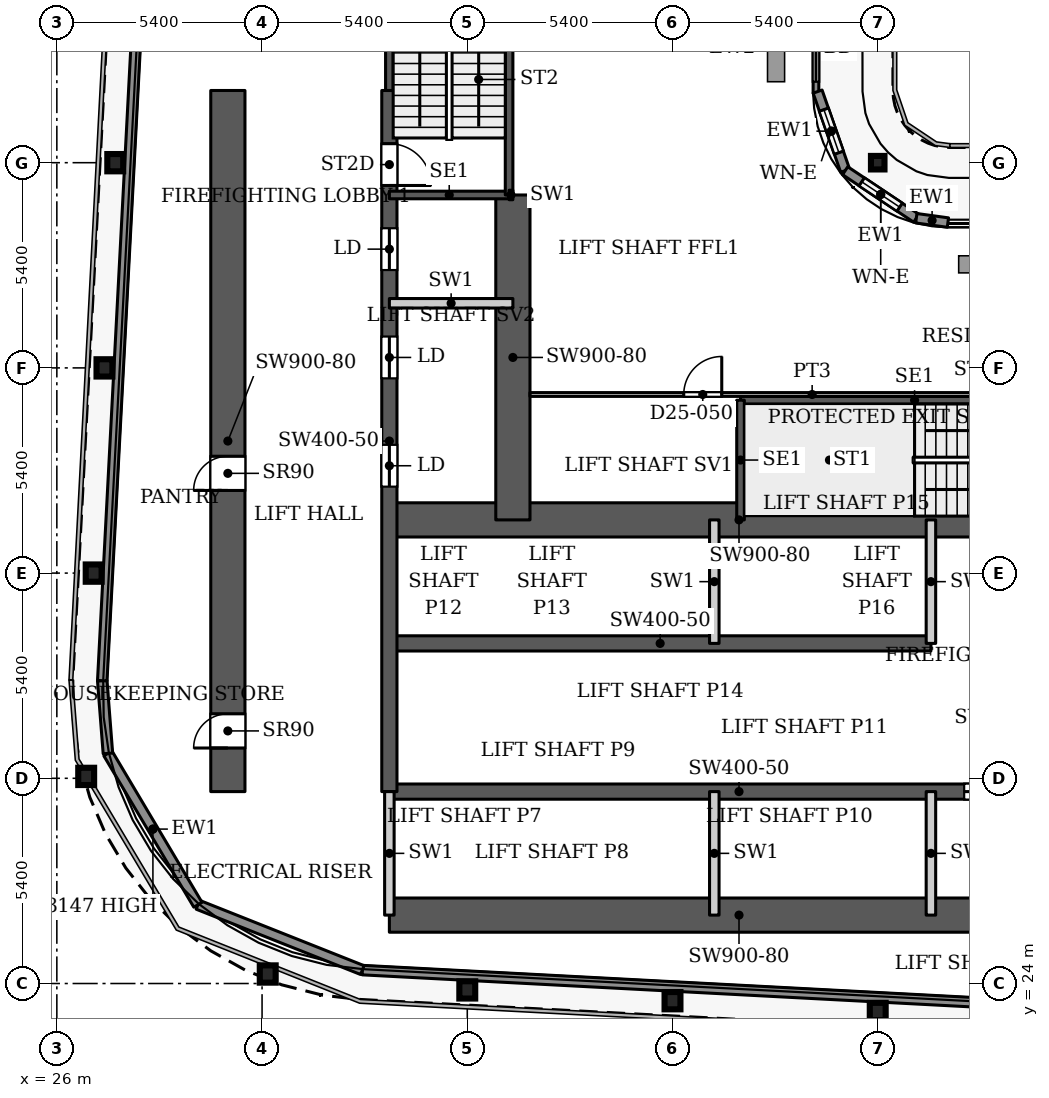
"""IFC4 building model, lengths in metres.
Left out: names, types, materials, properties, quantities, classifications, styles, units other than length and angle.
Written with IfcOpenShell. Run it as: python <this file> out.ifc"""

import sys

from ifc_helpers import new_model, si_unit, direction, frame, frame_2d, origin, origin_2d, place, context, subcontext, project, spatial, rectangle, hollow_rectangle, i_section, extrude, source, transform, mapped, element, fill, save


model = new_model("IFC4")
c1 = context("Model", 3, precision=1e-05, world=origin(), true_north=direction((0.0, 1.0)))
c2 = subcontext(c1, "Body", "Model", "MODEL_VIEW")
j1 = project(units=[si_unit("LENGTHUNIT", "METRE"), si_unit("PLANEANGLEUNIT", "RADIAN")], contexts=[c1])
p1 = place(None, origin())
s1 = spatial("IfcSite", under=j1, at=p1, CompositionType="ELEMENT")
p2 = place(p1, origin())
s2 = spatial("IfcBuilding", under=s1, at=p2, CompositionType="ELEMENT")
p3 = place(p2, frame((0.0, 0.0, 109.7)))
s3 = spatial("IfcBuildingStorey", under=s2, at=p3, CompositionType="ELEMENT", Elevation=109.7)
for number, where, z_axis, x_axis in (
    (1, (47.6, 23.264, 0.0), (0.0, 0.0, 1.0), (1.0, 0.0, 0.0)),
    (2, (42.2, 23.548, 0.0), (0.0, 0.0, 1.0), (1.0, 0.0, 0.0)),
    (3, (36.8, 23.832, 0.0), (0.0, 0.0, 1.0), (1.0, 0.0, 0.0)),
    (4, (31.549, 24.25, 0.0), (0.0, 0.0, 1.0), (1.0, 0.0, 0.0)),
    (5, (26.772, 29.45, 0.0), (0.0, 0.0, 1.0), (1.0, 0.0, 0.0)),
    (6, (26.969, 34.8, 0.0), (0.0, 0.0, 1.0), (1.0, 0.0, 0.0)),
    (7, (27.253, 40.2, 0.0), (0.0, 0.0, 1.0), (1.0, 0.0, 0.0)),
    (8, (27.537, 45.6, 0.0), (0.0, 0.0, 1.0), (1.0, 0.0, 0.0)),
):
    element("IfcColumn", number, at=place(p3, frame(where, z_axis=z_axis, x_axis=x_axis)), inside=s3, PredefinedType="COLUMN", context=c2, shape_type="SweptSolid", body=[
        extrude(i_section(OverallWidth=0.418, OverallDepth=0.455, WebThickness=0.042, FlangeThickness=0.068, FilletRadius=0.014, at=origin_2d()), origin(), (0.0, 0.0, 1.0), 3.9),
    ])
p4 = place(p3, frame((47.6, 45.6, 0.0), z_axis=(0.0, 0.0, 1.0), x_axis=(1.0, 0.0, 0.0)))
e9 = element("IfcColumn", 9, at=p4, inside=s3, PredefinedType="COLUMN", context=c2, shape_type="SweptSolid", body=[
    extrude(hollow_rectangle(XDim=0.356, YDim=0.356, WallThickness=0.016, InnerFilletRadius=0.016, OuterFilletRadius=0.032, at=origin_2d()), origin(), (0.0, 0.0, 1.0), 3.9),
])
p5 = place(p3, frame((34.75, 25.8, 0.0), z_axis=(0.0, 0.0, 1.0), x_axis=(1.0, 0.0, 0.0)))
e10 = element("IfcWall", 10, at=p5, inside=s3, PredefinedType="SHEAR", context=c2, shape_type="SweptSolid", body=[
    extrude(rectangle(XDim=18.4, YDim=0.9, at=frame_2d((9.2, 0.0))), origin(), (0.0, 0.0, 1.0), 3.9),
])
p6 = place(p3, frame((34.75, 29.05, 0.0), z_axis=(0.0, 0.0, 1.0), x_axis=(1.0, 0.0, 0.0)))
e11 = element("IfcWall", 11, at=p6, inside=s3, PredefinedType="SHEAR", context=c2, shape_type="SweptSolid", body=[
    extrude(rectangle(XDim=18.4, YDim=0.4, at=frame_2d((9.2, 0.0))), origin(), (0.0, 0.0, 1.0), 3.9),
])
p7 = place(p6, frame((15.125, 0.0, 0.0)))
e12 = element("IfcOpeningElement", 12, at=p7, cuts=e11, PredefinedType="OPENING", context=c2, shape_type="SweptSolid", body=[
    extrude(rectangle(XDim=1.1, YDim=2.2, at=frame_2d((0.55, 1.1))), frame((0.0, 0.21, 0.0), z_axis=(0.0, -1.0, 0.0), x_axis=(1.0, 0.0, 0.0)), (0.0, 0.0, 1.0), 0.42),
])
p8 = place(p3, frame((34.75, 32.95, 0.0), z_axis=(0.0, 0.0, 1.0), x_axis=(1.0, 0.0, 0.0)))
e13 = element("IfcWall", 13, at=p8, inside=s3, PredefinedType="SHEAR", context=c2, shape_type="SweptSolid", body=[
    extrude(rectangle(XDim=14.25, YDim=0.4, at=frame_2d((7.125, 0.0))), origin(), (0.0, 0.0, 1.0), 3.9),
])
p9 = place(p3, frame((34.75, 36.2, 0.0), z_axis=(0.0, 0.0, 1.0), x_axis=(1.0, 0.0, 0.0)))
e14 = element("IfcWall", 14, at=p9, inside=s3, PredefinedType="SHEAR", context=c2, shape_type="SweptSolid", body=[
    extrude(rectangle(XDim=18.4, YDim=0.9, at=frame_2d((9.2, 0.0))), origin(), (0.0, 0.0, 1.0), 3.9),
])
p10 = place(p9, frame((16.9, 0.0, 0.0)))
e15 = element("IfcOpeningElement", 15, at=p10, cuts=e14, PredefinedType="OPENING", context=c2, shape_type="SweptSolid", body=[
    extrude(rectangle(XDim=1.0, YDim=2.2, at=frame_2d((0.5, 1.1))), frame((0.0, 0.46, 0.0), z_axis=(0.0, -1.0, 0.0), x_axis=(1.0, 0.0, 0.0)), (0.0, 0.0, 1.0), 0.92),
])
p11 = place(p3, frame((34.75, 29.05, 0.0), z_axis=(0.0, 0.0, 1.0), x_axis=(0.0, 1.0, 0.0)))
e16 = element("IfcWall", 16, at=p11, inside=s3, PredefinedType="SHEAR", context=c2, shape_type="SweptSolid", body=[
    extrude(rectangle(XDim=18.45, YDim=0.4, at=frame_2d((9.225, 0.0))), origin(), (0.0, 0.0, 1.0), 3.9),
])
p12 = place(p11, frame((8.025, 0.0, 0.0)))
e17 = element("IfcOpeningElement", 17, at=p12, cuts=e16, PredefinedType="OPENING", context=c2, shape_type="SweptSolid", body=[
    extrude(rectangle(XDim=1.1, YDim=2.2, at=frame_2d((0.55, 1.1))), frame((0.0, 0.21, 0.0), z_axis=(0.0, -1.0, 0.0), x_axis=(1.0, 0.0, 0.0)), (0.0, 0.0, 1.0), 0.42),
])
p13 = place(p11, frame((10.875, 0.0, 0.0)))
e18 = element("IfcOpeningElement", 18, at=p13, cuts=e16, PredefinedType="OPENING", context=c2, shape_type="SweptSolid", body=[
    extrude(rectangle(XDim=1.1, YDim=2.2, at=frame_2d((0.55, 1.1))), frame((0.0, 0.21, 0.0), z_axis=(0.0, -1.0, 0.0), x_axis=(1.0, 0.0, 0.0)), (0.0, 0.0, 1.0), 0.42),
])
p14 = place(p11, frame((13.725, 0.0, 0.0)))
e19 = element("IfcOpeningElement", 19, at=p14, cuts=e16, PredefinedType="OPENING", context=c2, shape_type="SweptSolid", body=[
    extrude(rectangle(XDim=1.1, YDim=2.2, at=frame_2d((0.55, 1.1))), frame((0.0, 0.21, 0.0), z_axis=(0.0, -1.0, 0.0), x_axis=(1.0, 0.0, 0.0)), (0.0, 0.0, 1.0), 0.42),
])
p15 = place(p11, frame((15.95, 0.0, 0.0)))
e20 = element("IfcOpeningElement", 20, at=p15, cuts=e16, PredefinedType="OPENING", context=c2, shape_type="SweptSolid", body=[
    extrude(rectangle(XDim=1.1, YDim=2.2, at=frame_2d((0.55, 1.1))), frame((0.0, 0.21, 0.0), z_axis=(0.0, -1.0, 0.0), x_axis=(1.0, 0.0, 0.0)), (0.0, 0.0, 1.0), 0.42),
])
p16 = place(p3, frame((38.0, 36.2, 0.0), z_axis=(0.0, 0.0, 1.0), x_axis=(0.0, 1.0, 0.0)))
e21 = element("IfcWall", 21, at=p16, inside=s3, PredefinedType="SHEAR", context=c2, shape_type="SweptSolid", body=[
    extrude(rectangle(XDim=8.55, YDim=0.9, at=frame_2d((4.275, 0.0))), origin(), (0.0, 0.0, 1.0), 3.9),
])
p17 = place(p3, frame((30.5, 29.05, 0.0), z_axis=(0.0, 0.0, 1.0), x_axis=(0.0, 1.0, 0.0)))
e22 = element("IfcWall", 22, at=p17, inside=s3, PredefinedType="SHEAR", context=c2, shape_type="SweptSolid", body=[
    extrude(rectangle(XDim=18.45, YDim=0.9, at=frame_2d((9.225, 0.0))), origin(), (0.0, 0.0, 1.0), 3.9),
])
p18 = place(p17, frame((1.147, 0.0, 0.0)))
e23 = element("IfcOpeningElement", 23, at=p18, cuts=e22, PredefinedType="OPENING", context=c2, shape_type="SweptSolid", body=[
    extrude(rectangle(XDim=0.9, YDim=2.2, at=frame_2d((0.45, 1.1))), frame((0.0, 0.46, 0.0), z_axis=(0.0, -1.0, 0.0), x_axis=(1.0, 0.0, 0.0)), (0.0, 0.0, 1.0), 0.92),
])
p19 = place(p17, frame((7.925, 0.0, 0.0)))
e24 = element("IfcOpeningElement", 24, at=p19, cuts=e22, PredefinedType="OPENING", context=c2, shape_type="SweptSolid", body=[
    extrude(rectangle(XDim=0.9, YDim=2.2, at=frame_2d((0.45, 1.1))), frame((0.0, 0.46, 0.0), z_axis=(0.0, -1.0, 0.0), x_axis=(1.0, 0.0, 0.0)), (0.0, 0.0, 1.0), 0.92),
])
p20 = place(p3, frame((45.975, 49.83, 0.0), z_axis=(0.0, 0.0, 1.0), x_axis=(0.0, -1.0, 0.0)))
e25 = element("IfcWall", 25, at=p20, inside=s3, PredefinedType="SOLIDWALL", context=c2, shape_type="SweptSolid", body=[
    extrude(rectangle(XDim=2.4, YDim=0.15, at=frame_2d((1.2, 0.0))), origin(), (0.0, 0.0, 1.0), 3.75),
])
p21 = place(p20, frame((0.3, 0.0, 0.0)))
e26 = element("IfcOpeningElement", 26, at=p21, cuts=e25, PredefinedType="OPENING", context=c2, shape_type="SweptSolid", body=[
    extrude(rectangle(XDim=1.8, YDim=2.4, at=frame_2d((0.9, 1.2))), frame((0.0, 0.085, 0.0), z_axis=(0.0, -1.0, 0.0), x_axis=(1.0, 0.0, 0.0)), (0.0, 0.0, 1.0), 0.17),
])
p22 = place(p3, frame((46.018, 47.471, 0.0), z_axis=(0.0, 0.0, 1.0), x_axis=(0.328791208903, -0.944402637093, 0.0)))
e27 = element("IfcWall", 27, at=p22, inside=s3, PredefinedType="SOLIDWALL", context=c2, shape_type="SweptSolid", body=[
    extrude(rectangle(XDim=2.205, YDim=0.25, at=frame_2d((1.102, 0.0))), origin(), (0.0, 0.0, 1.0), 3.75),
])
p23 = place(p22, frame((0.503, 0.0, 0.6)))
e28 = element("IfcOpeningElement", 28, at=p23, cuts=e27, PredefinedType="OPENING", context=c2, shape_type="SweptSolid", body=[
    extrude(rectangle(XDim=1.2, YDim=2.1, at=frame_2d((0.6, 1.05))), frame((0.0, 0.135, 0.0), z_axis=(0.0, -1.0, 0.0), x_axis=(1.0, 0.0, 0.0)), (0.0, 0.0, 1.0), 0.27),
])
p24 = place(p3, frame((46.743, 45.389, 0.0), z_axis=(0.0, 0.0, 1.0), x_axis=(0.831449265529, -0.555600682912, 0.0)))
e29 = element("IfcWall", 29, at=p24, inside=s3, PredefinedType="SOLIDWALL", context=c2, shape_type="SweptSolid", body=[
    extrude(rectangle(XDim=2.251, YDim=0.25, at=frame_2d((1.126, 0.0))), origin(), (0.0, 0.0, 1.0), 3.75),
])
p25 = place(p24, frame((0.525, 0.0, 0.6)))
e30 = element("IfcOpeningElement", 30, at=p25, cuts=e29, PredefinedType="OPENING", context=c2, shape_type="SweptSolid", body=[
    extrude(rectangle(XDim=1.2, YDim=2.1, at=frame_2d((0.6, 1.05))), frame((0.0, 0.135, 0.0), z_axis=(0.0, -1.0, 0.0), x_axis=(1.0, 0.0, 0.0)), (0.0, 0.0, 1.0), 0.27),
])
p26 = place(p3, frame((48.615, 44.138, 0.0), z_axis=(0.0, 0.0, 1.0), x_axis=(0.990741504246, -0.135761819977, 0.0)))
e31 = element("IfcWall", 31, at=p26, inside=s3, PredefinedType="SOLIDWALL", context=c2, shape_type="SweptSolid", body=[
    extrude(rectangle(XDim=0.84, YDim=0.25, at=frame_2d((0.42, 0.0))), origin(), (0.0, 0.0, 1.0), 3.75),
])
p27 = place(p3, frame((100.586, 20.85, 0.0), z_axis=(0.0, 0.0, 1.0), x_axis=(-0.99861746497, 0.052565755559, 0.0)))
e32 = element("IfcWall", 32, at=p27, inside=s3, PredefinedType="SOLIDWALL", context=c2, shape_type="SweptSolid", body=[
    extrude(rectangle(XDim=66.639, YDim=0.25, at=frame_2d((33.319, 0.0))), origin(), (0.0, 0.0, 1.0), 3.75),
])
p28 = place(p3, frame((34.039, 24.353, 0.0), z_axis=(0.0, 0.0, 1.0), x_axis=(-0.929352825399, 0.369192803184, 0.0)))
e33 = element("IfcWall", 33, at=p28, inside=s3, PredefinedType="SOLIDWALL", context=c2, shape_type="SweptSolid", body=[
    extrude(rectangle(XDim=4.656, YDim=0.25, at=frame_2d((2.328, 0.0))), origin(), (0.0, 0.0, 1.0), 3.75),
])
p29 = place(p3, frame((29.712, 26.072, 0.0), z_axis=(0.0, 0.0, 1.0), x_axis=(-0.511028049012, 0.859564036662, 0.0)))
e34 = element("IfcWall", 34, at=p29, inside=s3, PredefinedType="SOLIDWALL", context=c2, shape_type="SweptSolid", body=[
    extrude(rectangle(XDim=4.634, YDim=0.25, at=frame_2d((2.317, 0.0))), origin(), (0.0, 0.0, 1.0), 3.147),
])
p30 = place(p3, frame((27.344, 30.055, 0.0), z_axis=(0.0, 0.0, 1.0), x_axis=(-0.077571675317, 0.99698677784, 0.0)))
e35 = element("IfcWall", 35, at=p30, inside=s3, PredefinedType="SOLIDWALL", context=c2, shape_type="SweptSolid", body=[
    extrude(rectangle(XDim=1.92, YDim=0.25, at=frame_2d((0.96, 0.0))), origin(), (0.0, 0.0, 1.0), 3.75),
])
p31 = place(p3, frame((27.195, 31.969, 0.0), z_axis=(0.0, 0.0, 1.0), x_axis=(0.052555284099, 0.998618016117, 0.0)))
e36 = element("IfcWall", 36, at=p31, inside=s3, PredefinedType="SOLIDWALL", context=c2, shape_type="SweptSolid", body=[
    extrude(rectangle(XDim=61.38, YDim=0.25, at=frame_2d((30.69, 0.0))), origin(), (0.0, 0.0, 1.0), 3.75),
])
p32 = place(p3, frame((43.99, 39.35, 0.0), z_axis=(0.0, 0.0, 1.0), x_axis=(1.0, 0.0, 0.0)))
e37 = element("IfcWall", 37, at=p32, inside=s3, PredefinedType="SHEAR", context=c2, shape_type="SweptSolid", body=[
    extrude(rectangle(XDim=9.16, YDim=0.2, at=frame_2d((4.58, 0.0))), origin(), (0.0, 0.0, 1.0), 3.9),
])
p33 = place(p3, frame((43.99, 36.2, 0.0), z_axis=(0.0, 0.0, 1.0), x_axis=(0.0, 1.0, 0.0)))
e38 = element("IfcWall", 38, at=p33, inside=s3, PredefinedType="SHEAR", context=c2, shape_type="SweptSolid", body=[
    extrude(rectangle(XDim=3.15, YDim=0.2, at=frame_2d((1.575, 0.0))), origin(), (0.0, 0.0, 1.0), 3.9),
])
p34 = place(p3, frame((34.75, 44.75, 0.0), z_axis=(0.0, 0.0, 1.0), x_axis=(1.0, 0.0, 0.0)))
e39 = element("IfcWall", 39, at=p34, inside=s3, PredefinedType="SHEAR", context=c2, shape_type="SweptSolid", body=[
    extrude(rectangle(XDim=3.15, YDim=0.2, at=frame_2d((1.575, 0.0))), origin(), (0.0, 0.0, 1.0), 3.9),
])
p35 = place(p3, frame((34.75, 47.5, 0.0), z_axis=(0.0, 0.0, 1.0), x_axis=(0.0, 1.0, 0.0)))
e40 = element("IfcWall", 40, at=p35, inside=s3, PredefinedType="SHEAR", context=c2, shape_type="SweptSolid", body=[
    extrude(rectangle(XDim=6.41, YDim=0.2, at=frame_2d((3.205, 0.0))), origin(), (0.0, 0.0, 1.0), 3.9),
])
p36 = place(p3, frame((37.9, 44.75, 0.0), z_axis=(0.0, 0.0, 1.0), x_axis=(0.0, 1.0, 0.0)))
e41 = element("IfcWall", 41, at=p36, inside=s3, PredefinedType="SHEAR", context=c2, shape_type="SweptSolid", body=[
    extrude(rectangle(XDim=9.16, YDim=0.2, at=frame_2d((4.58, 0.0))), origin(), (0.0, 0.0, 1.0), 3.9),
])
for number, where, z_axis, x_axis in (
    (42, (34.75, 25.8, 0.0), (0.0, 0.0, 1.0), (0.0, 1.0, 0.0)),
    (43, (43.3, 25.8, 0.0), (0.0, 0.0, 1.0), (0.0, 1.0, 0.0)),
    (44, (43.3, 32.95, 0.0), (0.0, 0.0, 1.0), (0.0, 1.0, 0.0)),
    (45, (49.0, 25.8, 0.0), (0.0, 0.0, 1.0), (0.0, 1.0, 0.0)),
    (46, (49.0, 32.95, 0.0), (0.0, 0.0, 1.0), (0.0, 1.0, 0.0)),
    (47, (34.75, 41.9, 0.0), (0.0, 0.0, 1.0), (1.0, 0.0, 0.0)),
):
    element("IfcWall", number, at=place(p3, frame(where, z_axis=z_axis, x_axis=x_axis)), inside=s3, PredefinedType="PARTITIONING", context=c2, shape_type="SweptSolid", body=[
        extrude(rectangle(XDim=3.25, YDim=0.25, at=frame_2d((1.625, 0.0))), origin(), (0.0, 0.0, 1.0), 3.9),
    ])
p37 = place(p3, frame((37.9, 44.75, 0.0), z_axis=(0.0, 0.0, 1.0), x_axis=(1.0, 0.0, 0.0)))
e48 = element("IfcWall", 48, at=p37, inside=s3, PredefinedType="PARTITIONING", context=c2, shape_type="SweptSolid", body=[
    extrude(rectangle(XDim=0.1, YDim=0.25, at=frame_2d((0.05, 0.0))), origin(), (0.0, 0.0, 1.0), 3.9),
])
p38 = place(p3, frame((38.449, 39.5, 0.0), z_axis=(0.0, 0.0, 1.0), x_axis=(1.0, 0.0, 0.0)))
e49 = element("IfcWall", 49, at=p38, inside=s3, PredefinedType="PARTITIONING", context=c2, shape_type="SweptSolid", body=[
    extrude(rectangle(XDim=14.851, YDim=0.1, at=frame_2d((7.426, 0.0))), origin(), (0.0, 0.0, 1.0), 3.6),
])
p39 = place(p38, frame((4.047, 0.0, 0.0)))
e50 = element("IfcOpeningElement", 50, at=p39, cuts=e49, PredefinedType="OPENING", context=c2, shape_type="SweptSolid", body=[
    extrude(rectangle(XDim=1.0, YDim=2.1, at=frame_2d((0.5, 1.05))), frame((0.0, 0.06, 0.0), z_axis=(0.0, -1.0, 0.0), x_axis=(1.0, 0.0, 0.0)), (0.0, 0.0, 1.0), 0.12),
])
m1 = source(origin(), c2, "Body", "SweptSolid", [
    extrude(rectangle(XDim=1.8, YDim=2.4, at=frame_2d((0.9, 1.2))), frame((0.0, 0.025, 0.0), z_axis=(0.0, -1.0, 0.0), x_axis=(1.0, 0.0, 0.0)), (0.0, 0.0, 1.0), 0.05),
])
p40 = place(p21, origin())
e51 = element("IfcDoor", 51, at=p40, inside=s3, OperationType="SLIDING_TO_LEFT", PredefinedType="DOOR", context=c2, shape_type="MappedRepresentation", body=[
    mapped(m1, transform((0.0, 0.0, 0.0), x_axis=(1.0, 0.0, 0.0), y_axis=(0.0, 1.0, 0.0), z_axis=(0.0, 0.0, 1.0), scale=1.0)),
])
fill(e26, e51)
m2 = source(origin(), c2, "Body", "SweptSolid", [
    extrude(rectangle(XDim=1.2, YDim=2.1, at=frame_2d((0.6, 1.05))), frame((0.0, 0.03, 0.0), z_axis=(0.0, -1.0, 0.0), x_axis=(1.0, 0.0, 0.0)), (0.0, 0.0, 1.0), 0.06),
])
p41 = place(p23, origin())
e52 = element("IfcWindow", 52, at=p41, inside=s3, PartitioningType="SINGLE_PANEL", PredefinedType="WINDOW", context=c2, shape_type="MappedRepresentation", body=[
    mapped(m2, transform((0.0, 0.0, 0.0), x_axis=(1.0, 0.0, 0.0), y_axis=(0.0, 1.0, 0.0), z_axis=(0.0, 0.0, 1.0), scale=1.0)),
])
fill(e28, e52)
p42 = place(p25, origin())
e53 = element("IfcWindow", 53, at=p42, inside=s3, PartitioningType="SINGLE_PANEL", PredefinedType="WINDOW", context=c2, shape_type="MappedRepresentation", body=[
    mapped(m2, transform((0.0, 0.0, 0.0), x_axis=(1.0, 0.0, 0.0), y_axis=(0.0, 1.0, 0.0), z_axis=(0.0, 0.0, 1.0), scale=1.0)),
])
fill(e30, e53)
m3 = source(origin(), c2, "Body", "SweptSolid", [
    extrude(rectangle(XDim=1.1, YDim=2.2, at=frame_2d((0.55, 1.1))), frame((0.0, 0.025, 0.0), z_axis=(0.0, -1.0, 0.0), x_axis=(1.0, 0.0, 0.0)), (0.0, 0.0, 1.0), 0.05),
])
p43 = place(p12, origin())
e54 = element("IfcDoor", 54, at=p43, inside=s3, OperationType="SLIDING_TO_LEFT", PredefinedType="DOOR", context=c2, shape_type="MappedRepresentation", body=[
    mapped(m3, transform((0.0, 0.0, 0.0), x_axis=(1.0, 0.0, 0.0), y_axis=(0.0, 1.0, 0.0), z_axis=(0.0, 0.0, 1.0), scale=1.0)),
])
fill(e17, e54)
p44 = place(p13, origin())
e55 = element("IfcDoor", 55, at=p44, inside=s3, OperationType="SLIDING_TO_LEFT", PredefinedType="DOOR", context=c2, shape_type="MappedRepresentation", body=[
    mapped(m3, transform((0.0, 0.0, 0.0), x_axis=(1.0, 0.0, 0.0), y_axis=(0.0, 1.0, 0.0), z_axis=(0.0, 0.0, 1.0), scale=1.0)),
])
fill(e18, e55)
p45 = place(p14, origin())
e56 = element("IfcDoor", 56, at=p45, inside=s3, OperationType="SLIDING_TO_LEFT", PredefinedType="DOOR", context=c2, shape_type="MappedRepresentation", body=[
    mapped(m3, transform((0.0, 0.0, 0.0), x_axis=(1.0, 0.0, 0.0), y_axis=(0.0, 1.0, 0.0), z_axis=(0.0, 0.0, 1.0), scale=1.0)),
])
fill(e19, e56)
p46 = place(p7, origin())
e57 = element("IfcDoor", 57, at=p46, inside=s3, OperationType="SLIDING_TO_LEFT", PredefinedType="DOOR", context=c2, shape_type="MappedRepresentation", body=[
    mapped(m3, transform((0.0, 0.0, 0.0), x_axis=(1.0, 0.0, 0.0), y_axis=(0.0, 1.0, 0.0), z_axis=(0.0, 0.0, 1.0), scale=1.0)),
])
fill(e12, e57)
m4 = source(origin(), c2, "Body", "SweptSolid", [
    extrude(rectangle(XDim=0.9, YDim=2.2, at=frame_2d((0.45, 1.1))), frame((0.0, 0.025, 0.0), z_axis=(0.0, -1.0, 0.0), x_axis=(1.0, 0.0, 0.0)), (0.0, 0.0, 1.0), 0.05),
])
p47 = place(p18, origin())
e58 = element("IfcDoor", 58, at=p47, inside=s3, OperationType="SINGLE_SWING_LEFT", PredefinedType="DOOR", context=c2, shape_type="MappedRepresentation", body=[
    mapped(m4, transform((0.0, 0.0, 0.0), x_axis=(1.0, 0.0, 0.0), y_axis=(0.0, 1.0, 0.0), z_axis=(0.0, 0.0, 1.0), scale=1.0)),
])
fill(e23, e58)
p48 = place(p19, origin())
e59 = element("IfcDoor", 59, at=p48, inside=s3, OperationType="SINGLE_SWING_LEFT", PredefinedType="DOOR", context=c2, shape_type="MappedRepresentation", body=[
    mapped(m4, transform((0.0, 0.0, 0.0), x_axis=(1.0, 0.0, 0.0), y_axis=(0.0, 1.0, 0.0), z_axis=(0.0, 0.0, 1.0), scale=1.0)),
])
fill(e24, e59)
m5 = source(origin(), c2, "Body", "SweptSolid", [
    extrude(rectangle(XDim=1.1, YDim=2.2, at=frame_2d((0.55, 1.1))), frame((0.0, 0.025, 0.0), z_axis=(0.0, -1.0, 0.0), x_axis=(1.0, 0.0, 0.0)), (0.0, 0.0, 1.0), 0.05),
])
p49 = place(p15, origin())
e60 = element("IfcDoor", 60, at=p49, inside=s3, OperationType="SINGLE_SWING_RIGHT", PredefinedType="DOOR", context=c2, shape_type="MappedRepresentation", body=[
    mapped(m5, transform((0.0, 0.0, 0.0), x_axis=(1.0, 0.0, 0.0), y_axis=(0.0, 1.0, 0.0), z_axis=(0.0, 0.0, 1.0), scale=1.0)),
])
fill(e20, e60)
m6 = source(origin(), c2, "Body", "SweptSolid", [
    extrude(rectangle(XDim=1.0, YDim=2.1, at=frame_2d((0.5, 1.05))), frame((0.0, 0.025, 0.0), z_axis=(0.0, -1.0, 0.0), x_axis=(1.0, 0.0, 0.0)), (0.0, 0.0, 1.0), 0.05),
])
p50 = place(p39, origin())
e61 = element("IfcDoor", 61, at=p50, inside=s3, OperationType="SINGLE_SWING_LEFT", PredefinedType="DOOR", context=c2, shape_type="MappedRepresentation", body=[
    mapped(m6, transform((0.0, 0.0, 0.0), x_axis=(1.0, 0.0, 0.0), y_axis=(0.0, 1.0, 0.0), z_axis=(0.0, 0.0, 1.0), scale=1.0)),
])
fill(e50, e61)
save(model, sys.argv[1])
